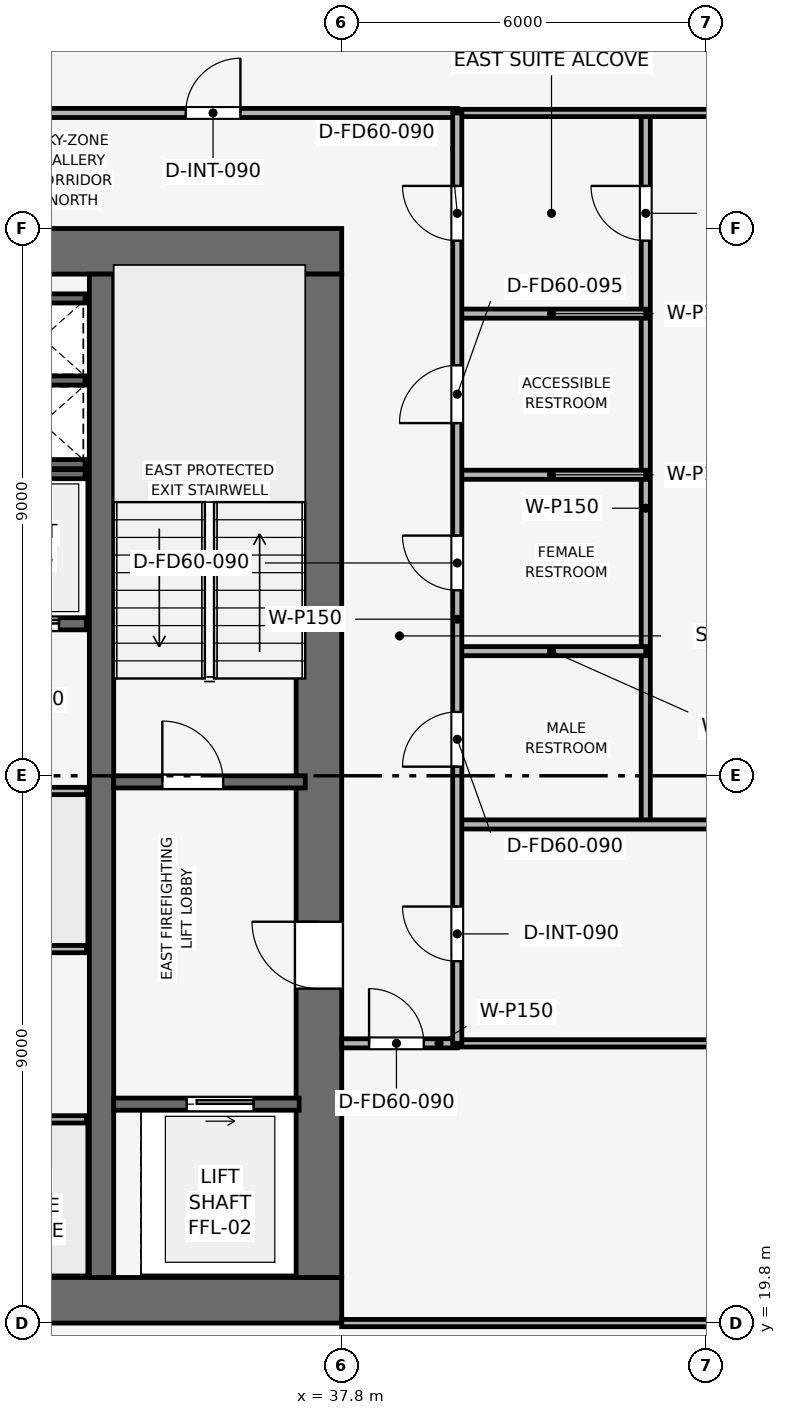
"""IFC4 building model, lengths in metres.
Left out: names, types, materials, properties, quantities, classifications, styles, units other than length and angle.
Written with IfcOpenShell. Run it as: python <this file> out.ifc"""

import sys

from ifc_helpers import new_model, si_unit, direction, frame, frame_2d, origin, place, context, subcontext, project, spatial, rectangle, extrude, element, fill, save


model = new_model("IFC4")
c1 = context("Model", 3, precision=1e-05, world=origin(), true_north=direction((0.0, 1.0)))
c2 = subcontext(c1, "Body", "Model", "MODEL_VIEW")
j1 = project(units=[si_unit("LENGTHUNIT", "METRE"), si_unit("PLANEANGLEUNIT", "RADIAN")], contexts=[c1])
p1 = place(None, origin())
s1 = spatial("IfcSite", under=j1, at=p1, CompositionType="ELEMENT")
p2 = place(p1, origin())
s2 = spatial("IfcBuilding", under=s1, at=p2, CompositionType="ELEMENT")
p3 = place(p2, frame((0.0, 0.0, 254.1)))
s3 = spatial("IfcBuildingStorey", under=s2, at=p3, CompositionType="ELEMENT", Elevation=254.1)
p4 = place(p3, frame((19.8, 20.175, 0.0), z_axis=(0.0, 0.0, 1.0), x_axis=(1.0, 0.0, 0.0)))
e1 = element("IfcWall", 1, at=p4, inside=s3, PredefinedType="SHEAR", context=c2, shape_type="SweptSolid", body=[
    extrude(rectangle(XDim=18.0, YDim=0.75, at=frame_2d((9.0, 0.0))), origin(), (0.0, 0.0, 1.0), 3.75),
])
p5 = place(p3, frame((19.8, 37.425, 0.0), z_axis=(0.0, 0.0, 1.0), x_axis=(1.0, 0.0, 0.0)))
e2 = element("IfcWall", 2, at=p5, inside=s3, PredefinedType="SHEAR", context=c2, shape_type="SweptSolid", body=[
    extrude(rectangle(XDim=18.0, YDim=0.75, at=frame_2d((9.0, 0.0))), origin(), (0.0, 0.0, 1.0), 3.75),
])
p6 = place(p5, frame((7.05, 0.0, 0.0)))
e3 = element("IfcOpeningElement", 3, at=p6, cuts=e2, PredefinedType="OPENING", context=c2, shape_type="SweptSolid", body=[
    extrude(rectangle(XDim=1.1, YDim=2.15, at=frame_2d((0.55, 1.075))), frame((0.0, 0.385, 0.0), z_axis=(0.0, -1.0, 0.0), x_axis=(1.0, 0.0, 0.0)), (0.0, 0.0, 1.0), 0.77),
])
p7 = place(p3, frame((37.425, 20.55, 0.0), z_axis=(0.0, 0.0, 1.0), x_axis=(0.0, 1.0, 0.0)))
e4 = element("IfcWall", 4, at=p7, inside=s3, PredefinedType="SHEAR", context=c2, shape_type="SweptSolid", body=[
    extrude(rectangle(XDim=16.5, YDim=0.75, at=frame_2d((8.25, 0.0))), origin(), (0.0, 0.0, 1.0), 3.75),
])
p8 = place(p7, frame((4.75, 0.0, 0.0)))
e5 = element("IfcOpeningElement", 5, at=p8, cuts=e4, PredefinedType="OPENING", context=c2, shape_type="SweptSolid", body=[
    extrude(rectangle(XDim=1.1, YDim=2.15, at=frame_2d((0.55, 1.075))), frame((0.0, 0.385, 0.0), z_axis=(0.0, -1.0, 0.0), x_axis=(1.0, 0.0, 0.0)), (0.0, 0.0, 1.0), 0.77),
])
p9 = place(p3, frame((33.85, 20.55, 0.0), z_axis=(0.0, 0.0, 1.0), x_axis=(0.0, 1.0, 0.0)))
e6 = element("IfcWall", 6, at=p9, inside=s3, PredefinedType="SHEAR", context=c2, shape_type="SweptSolid", body=[
    extrude(rectangle(XDim=16.5, YDim=0.4, at=frame_2d((8.25, 0.0))), origin(), (0.0, 0.0, 1.0), 3.75),
])
p10 = place(p3, frame((34.05, 28.7, 0.0), z_axis=(0.0, 0.0, 1.0), x_axis=(1.0, 0.0, 0.0)))
e7 = element("IfcWall", 7, at=p10, inside=s3, PredefinedType="SHEAR", context=c2, shape_type="SweptSolid", body=[
    extrude(rectangle(XDim=3.15, YDim=0.2, at=frame_2d((1.575, 0.0))), origin(), (0.0, 0.0, 1.0), 3.5),
])
p11 = place(p10, frame((0.8, 0.0, 0.0)))
e8 = element("IfcOpeningElement", 8, at=p11, cuts=e7, PredefinedType="OPENING", context=c2, shape_type="SweptSolid", body=[
    extrude(rectangle(XDim=1.0, YDim=2.1, at=frame_2d((0.5, 1.05))), frame((0.0, 0.11, 0.0), z_axis=(0.0, -1.0, 0.0), x_axis=(1.0, 0.0, 0.0)), (0.0, 0.0, 1.0), 0.22),
])
for number, where, z_axis, x_axis in (
    (9, (32.25, 33.925, 0.0), (0.0, 0.0, 1.0), (1.0, 0.0, 0.0)),
    (10, (32.25, 35.3, 0.0), (0.0, 0.0, 1.0), (1.0, 0.0, 0.0)),
):
    element("IfcWall", number, at=place(p3, frame(where, z_axis=z_axis, x_axis=x_axis)), inside=s3, PredefinedType="SHEAR", context=c2, shape_type="SweptSolid", body=[
        extrude(rectangle(XDim=1.33, YDim=0.15, at=frame_2d((0.665, 0.0))), origin(), (0.0, 0.0, 1.0), 3.5),
    ])
p12 = place(p3, frame((34.05, 23.4, 0.0), z_axis=(0.0, 0.0, 1.0), x_axis=(1.0, 0.0, 0.0)))
e11 = element("IfcWall", 11, at=p12, inside=s3, PredefinedType="SHEAR", context=c2, shape_type="SweptSolid", body=[
    extrude(rectangle(XDim=3.05, YDim=0.2, at=frame_2d((1.525, 0.0))), origin(), (0.0, 0.0, 1.0), 3.5),
])
p13 = place(p12, frame((1.2, 0.0, 0.0)))
e12 = element("IfcOpeningElement", 12, at=p13, cuts=e11, PredefinedType="OPENING", context=c2, shape_type="SweptSolid", body=[
    extrude(rectangle(XDim=1.1, YDim=2.15, at=frame_2d((0.55, 1.075))), frame((0.0, 0.11, 0.0), z_axis=(0.0, -1.0, 0.0), x_axis=(1.0, 0.0, 0.0)), (0.0, 0.0, 1.0), 0.22),
])
p14 = place(p3, frame((31.6, 31.3, 0.0), z_axis=(0.0, 0.0, 1.0), x_axis=(1.0, 0.0, 0.0)))
e13 = element("IfcWall", 13, at=p14, inside=s3, PredefinedType="SHEAR", context=c2, shape_type="SweptSolid", body=[
    extrude(rectangle(XDim=2.0, YDim=0.2, at=frame_2d((1.0, 0.0))), origin(), (0.0, 0.0, 1.0), 3.5),
])
p15 = place(p14, frame((0.45, 0.0, 0.0)))
e14 = element("IfcOpeningElement", 14, at=p15, cuts=e13, PredefinedType="OPENING", context=c2, shape_type="SweptSolid", body=[
    extrude(rectangle(XDim=1.1, YDim=2.15, at=frame_2d((0.55, 1.075))), frame((0.0, 0.11, 0.0), z_axis=(0.0, -1.0, 0.0), x_axis=(1.0, 0.0, 0.0)), (0.0, 0.0, 1.0), 0.22),
])
p16 = place(p3, frame((32.25, 36.65, 0.0), z_axis=(0.0, 0.0, 1.0), x_axis=(1.0, 0.0, 0.0)))
e15 = element("IfcWall", 15, at=p16, inside=s3, PredefinedType="SHEAR", context=c2, shape_type="SweptSolid", body=[
    extrude(rectangle(XDim=1.33, YDim=0.15, at=frame_2d((0.665, 0.0))), origin(), (0.0, 0.0, 1.0), 3.5),
])
p17 = place(p3, frame((29.5, 33.76, 0.0), z_axis=(0.0, 0.0, 1.0), x_axis=(1.0, 0.0, 0.0)))
e16 = element("IfcWall", 16, at=p17, inside=s3, PredefinedType="SHEAR", context=c2, shape_type="SweptSolid", body=[
    extrude(rectangle(XDim=4.08, YDim=0.15, at=frame_2d((2.04, 0.0))), origin(), (0.0, 0.0, 1.0), 3.5),
])
p18 = place(p3, frame((29.55, 23.15, 0.0), z_axis=(0.0, 0.0, 1.0), x_axis=(1.0, 0.0, 0.0)))
e17 = element("IfcWall", 17, at=p18, inside=s3, PredefinedType="PARTITIONING", context=c2, shape_type="SweptSolid", body=[
    extrude(rectangle(XDim=4.05, YDim=0.12, at=frame_2d((2.025, 0.0))), origin(), (0.0, 0.0, 1.0), 3.5),
])
p19 = place(p18, frame((1.575, 0.0, 0.0)))
e18 = element("IfcOpeningElement", 18, at=p19, cuts=e17, PredefinedType="OPENING", context=c2, shape_type="SweptSolid", body=[
    extrude(rectangle(XDim=0.9, YDim=2.1, at=frame_2d((0.45, 1.05))), frame((0.0, 0.07, 0.0), z_axis=(0.0, -1.0, 0.0), x_axis=(1.0, 0.0, 0.0)), (0.0, 0.0, 1.0), 0.14),
])
p20 = place(p3, frame((29.55, 25.95, 0.0), z_axis=(0.0, 0.0, 1.0), x_axis=(1.0, 0.0, 0.0)))
e19 = element("IfcWall", 19, at=p20, inside=s3, PredefinedType="PARTITIONING", context=c2, shape_type="SweptSolid", body=[
    extrude(rectangle(XDim=4.05, YDim=0.12, at=frame_2d((2.025, 0.0))), origin(), (0.0, 0.0, 1.0), 3.5),
])
p21 = place(p20, frame((1.575, 0.0, 0.0)))
e20 = element("IfcOpeningElement", 20, at=p21, cuts=e19, PredefinedType="OPENING", context=c2, shape_type="SweptSolid", body=[
    extrude(rectangle(XDim=0.9, YDim=2.1, at=frame_2d((0.45, 1.05))), frame((0.0, 0.07, 0.0), z_axis=(0.0, -1.0, 0.0), x_axis=(1.0, 0.0, 0.0)), (0.0, 0.0, 1.0), 0.14),
])
p22 = place(p3, frame((29.55, 28.55, 0.0), z_axis=(0.0, 0.0, 1.0), x_axis=(1.0, 0.0, 0.0)))
e21 = element("IfcWall", 21, at=p22, inside=s3, PredefinedType="PARTITIONING", context=c2, shape_type="SweptSolid", body=[
    extrude(rectangle(XDim=4.05, YDim=0.12, at=frame_2d((2.025, 0.0))), origin(), (0.0, 0.0, 1.0), 3.5),
])
p23 = place(p3, frame((37.8, 19.8, 0.0), z_axis=(0.0, 0.0, 1.0), x_axis=(1.0, 0.0, 0.0)))
e22 = element("IfcWall", 22, at=p23, inside=s3, PredefinedType="PARTITIONING", context=c2, shape_type="SweptSolid", body=[
    extrude(rectangle(XDim=15.77, YDim=0.12, at=frame_2d((7.885, 0.0))), origin(), (0.0, 0.0, 1.0), 3.085),
])
p24 = place(p3, frame((37.8, 24.4, 0.0), z_axis=(0.0, 0.0, 1.0), x_axis=(1.0, 0.0, 0.0)))
e23 = element("IfcWall", 23, at=p24, inside=s3, PredefinedType="PARTITIONING", context=c2, shape_type="SweptSolid", body=[
    extrude(rectangle(XDim=1.9, YDim=0.15, at=frame_2d((0.95, 0.0))), origin(), (0.0, 0.0, 1.0), 3.5),
])
p25 = place(p24, frame((0.45, 0.0, 0.0)))
e24 = element("IfcOpeningElement", 24, at=p25, cuts=e23, PredefinedType="OPENING", context=c2, shape_type="SweptSolid", body=[
    extrude(rectangle(XDim=0.9, YDim=2.1, at=frame_2d((0.45, 1.05))), frame((0.0, 0.085, 0.0), z_axis=(0.0, -1.0, 0.0), x_axis=(1.0, 0.0, 0.0)), (0.0, 0.0, 1.0), 0.17),
])
p26 = place(p3, frame((39.7, 24.4, 0.0), z_axis=(0.0, 0.0, 1.0), x_axis=(1.0, 0.0, 0.0)))
e25 = element("IfcWall", 25, at=p26, inside=s3, PredefinedType="PARTITIONING", context=c2, shape_type="SweptSolid", body=[
    extrude(rectangle(XDim=13.87, YDim=0.12, at=frame_2d((6.935, 0.0))), origin(), (0.0, 0.0, 1.0), 3.085),
])
p27 = place(p3, frame((42.8, 28.0, 0.0), z_axis=(0.0, 0.0, 1.0), x_axis=(0.0, 1.0, 0.0)))
e26 = element("IfcWall", 26, at=p27, inside=s3, PredefinedType="PARTITIONING", context=c2, shape_type="SweptSolid", body=[
    extrude(rectangle(XDim=11.7, YDim=0.15, at=frame_2d((5.85, 0.0))), origin(), (0.0, 0.0, 1.0), 3.085),
])
p28 = place(p27, frame((9.6, 0.0, 0.0)))
e27 = element("IfcOpeningElement", 27, at=p28, cuts=e26, PredefinedType="OPENING", context=c2, shape_type="SweptSolid", body=[
    extrude(rectangle(XDim=0.9, YDim=2.1, at=frame_2d((0.45, 1.05))), frame((0.0, 0.085, 0.0), z_axis=(0.0, -1.0, 0.0), x_axis=(1.0, 0.0, 0.0)), (0.0, 0.0, 1.0), 0.17),
])
p29 = place(p3, frame((39.7, 28.0, 0.0), z_axis=(0.0, 0.0, 1.0), x_axis=(1.0, 0.0, 0.0)))
e28 = element("IfcWall", 28, at=p29, inside=s3, PredefinedType="PARTITIONING", context=c2, shape_type="SweptSolid", body=[
    extrude(rectangle(XDim=13.87, YDim=0.15, at=frame_2d((6.935, 0.0))), origin(), (0.0, 0.0, 1.0), 3.085),
])
for number, where, z_axis, x_axis in (
    (29, (39.7, 36.4, 0.0), (0.0, 0.0, 1.0), (1.0, 0.0, 0.0)),
    (30, (39.7, 30.85, 0.0), (0.0, 0.0, 1.0), (1.0, 0.0, 0.0)),
    (31, (39.7, 33.75, 0.0), (0.0, 0.0, 1.0), (1.0, 0.0, 0.0)),
):
    element("IfcWall", number, at=place(p3, frame(where, z_axis=z_axis, x_axis=x_axis)), inside=s3, PredefinedType="PARTITIONING", context=c2, shape_type="SweptSolid", body=[
        extrude(rectangle(XDim=3.1, YDim=0.15, at=frame_2d((1.55, 0.0))), origin(), (0.0, 0.0, 1.0), 3.5),
    ])
p30 = place(p3, frame((39.7, 39.7, 0.0), z_axis=(0.0, 0.0, 1.0), x_axis=(1.0, 0.0, 0.0)))
e32 = element("IfcWall", 32, at=p30, inside=s3, PredefinedType="PARTITIONING", context=c2, shape_type="SweptSolid", body=[
    extrude(rectangle(XDim=13.87, YDim=0.12, at=frame_2d((6.935, 0.0))), origin(), (0.0, 0.0, 1.0), 3.085),
])
p31 = place(p3, frame((17.9, 39.7, 0.0), z_axis=(0.0, 0.0, 1.0), x_axis=(1.0, 0.0, 0.0)))
e33 = element("IfcWall", 33, at=p31, inside=s3, PredefinedType="PARTITIONING", context=c2, shape_type="SweptSolid", body=[
    extrude(rectangle(XDim=21.8, YDim=0.15, at=frame_2d((10.9, 0.0))), origin(), (0.0, 0.0, 1.0), 3.085),
])
p32 = place(p31, frame((0.7, 0.0, 0.0)))
e34 = element("IfcOpeningElement", 34, at=p32, cuts=e33, PredefinedType="OPENING", context=c2, shape_type="SweptSolid", body=[
    extrude(rectangle(XDim=0.9, YDim=2.1, at=frame_2d((0.45, 1.05))), frame((0.0, 0.085, 0.0), z_axis=(0.0, -1.0, 0.0), x_axis=(1.0, 0.0, 0.0)), (0.0, 0.0, 1.0), 0.17),
])
p33 = place(p31, frame((4.801, 0.0, 0.0)))
e35 = element("IfcOpeningElement", 35, at=p33, cuts=e33, PredefinedType="OPENING", context=c2, shape_type="SweptSolid", body=[
    extrude(rectangle(XDim=0.9, YDim=2.1, at=frame_2d((0.45, 1.05))), frame((0.0, 0.085, 0.0), z_axis=(0.0, -1.0, 0.0), x_axis=(1.0, 0.0, 0.0)), (0.0, 0.0, 1.0), 0.17),
])
p34 = place(p31, frame((10.535, 0.0, 0.0)))
e36 = element("IfcOpeningElement", 36, at=p34, cuts=e33, PredefinedType="OPENING", context=c2, shape_type="SweptSolid", body=[
    extrude(rectangle(XDim=0.9, YDim=2.1, at=frame_2d((0.45, 1.05))), frame((0.0, 0.085, 0.0), z_axis=(0.0, -1.0, 0.0), x_axis=(1.0, 0.0, 0.0)), (0.0, 0.0, 1.0), 0.17),
])
p35 = place(p31, frame((17.334, 0.0, 0.0)))
e37 = element("IfcOpeningElement", 37, at=p35, cuts=e33, PredefinedType="OPENING", context=c2, shape_type="SweptSolid", body=[
    extrude(rectangle(XDim=0.9, YDim=2.1, at=frame_2d((0.45, 1.05))), frame((0.0, 0.085, 0.0), z_axis=(0.0, -1.0, 0.0), x_axis=(1.0, 0.0, 0.0)), (0.0, 0.0, 1.0), 0.17),
])
p36 = place(p3, frame((39.7, 24.4, 0.0), z_axis=(0.0, 0.0, 1.0), x_axis=(0.0, 1.0, 0.0)))
e38 = element("IfcWall", 38, at=p36, inside=s3, PredefinedType="PARTITIONING", context=c2, shape_type="SweptSolid", body=[
    extrude(rectangle(XDim=15.3, YDim=0.15, at=frame_2d((7.65, 0.0))), origin(), (0.0, 0.0, 1.0), 3.085),
])
p37 = place(p36, frame((1.35, 0.0, 0.0)))
e39 = element("IfcOpeningElement", 39, at=p37, cuts=e38, PredefinedType="OPENING", context=c2, shape_type="SweptSolid", body=[
    extrude(rectangle(XDim=0.9, YDim=2.1, at=frame_2d((0.45, 1.05))), frame((0.0, 0.085, 0.0), z_axis=(0.0, -1.0, 0.0), x_axis=(1.0, 0.0, 0.0)), (0.0, 0.0, 1.0), 0.17),
])
p38 = place(p36, frame((4.55, 0.0, 0.0)))
e40 = element("IfcOpeningElement", 40, at=p38, cuts=e38, PredefinedType="OPENING", context=c2, shape_type="SweptSolid", body=[
    extrude(rectangle(XDim=0.9, YDim=2.1, at=frame_2d((0.45, 1.05))), frame((0.0, 0.085, 0.0), z_axis=(0.0, -1.0, 0.0), x_axis=(1.0, 0.0, 0.0)), (0.0, 0.0, 1.0), 0.17),
])
p39 = place(p36, frame((7.45, 0.0, 0.0)))
e41 = element("IfcOpeningElement", 41, at=p39, cuts=e38, PredefinedType="OPENING", context=c2, shape_type="SweptSolid", body=[
    extrude(rectangle(XDim=0.9, YDim=2.1, at=frame_2d((0.45, 1.05))), frame((0.0, 0.085, 0.0), z_axis=(0.0, -1.0, 0.0), x_axis=(1.0, 0.0, 0.0)), (0.0, 0.0, 1.0), 0.17),
])
p40 = place(p36, frame((10.2, 0.0, 0.0)))
e42 = element("IfcOpeningElement", 42, at=p40, cuts=e38, PredefinedType="OPENING", context=c2, shape_type="SweptSolid", body=[
    extrude(rectangle(XDim=0.95, YDim=2.1, at=frame_2d((0.475, 1.05))), frame((0.0, 0.085, 0.0), z_axis=(0.0, -1.0, 0.0), x_axis=(1.0, 0.0, 0.0)), (0.0, 0.0, 1.0), 0.17),
])
p41 = place(p36, frame((13.2, 0.0, 0.0)))
e43 = element("IfcOpeningElement", 43, at=p41, cuts=e38, PredefinedType="OPENING", context=c2, shape_type="SweptSolid", body=[
    extrude(rectangle(XDim=0.9, YDim=2.1, at=frame_2d((0.45, 1.05))), frame((0.0, 0.085, 0.0), z_axis=(0.0, -1.0, 0.0), x_axis=(1.0, 0.0, 0.0)), (0.0, 0.0, 1.0), 0.17),
])
p42 = place(p11, origin())
e44 = element("IfcDoor", 44, at=p42, inside=s3, OperationType="SINGLE_SWING_LEFT", PredefinedType="DOOR", context=c2, shape_type="SweptSolid", body=[
    extrude(rectangle(XDim=1.0, YDim=2.1, at=frame_2d((0.5, 1.05))), frame((0.0, 0.025, 0.0), z_axis=(0.0, -1.0, 0.0), x_axis=(1.0, 0.0, 0.0)), (0.0, 0.0, 1.0), 0.05),
])
fill(e8, e44)
p43 = place(p13, origin())
e45 = element("IfcDoor", 45, at=p43, inside=s3, OperationType="SLIDING_TO_RIGHT", PredefinedType="DOOR", context=c2, shape_type="SweptSolid", body=[
    extrude(rectangle(XDim=1.1, YDim=2.15, at=frame_2d((0.55, 1.075))), frame((0.0, 0.025, 0.0), z_axis=(0.0, -1.0, 0.0), x_axis=(1.0, 0.0, 0.0)), (0.0, 0.0, 1.0), 0.05),
])
fill(e12, e45)
p44 = place(p15, origin())
e46 = element("IfcDoor", 46, at=p44, inside=s3, OperationType="SLIDING_TO_RIGHT", PredefinedType="DOOR", context=c2, shape_type="SweptSolid", body=[
    extrude(rectangle(XDim=1.1, YDim=2.15, at=frame_2d((0.55, 1.075))), frame((0.0, 0.025, 0.0), z_axis=(0.0, -1.0, 0.0), x_axis=(1.0, 0.0, 0.0)), (0.0, 0.0, 1.0), 0.05),
])
fill(e14, e46)
p45 = place(p25, origin())
e47 = element("IfcDoor", 47, at=p45, inside=s3, OperationType="SINGLE_SWING_LEFT", PredefinedType="DOOR", context=c2, shape_type="SweptSolid", body=[
    extrude(rectangle(XDim=0.9, YDim=2.1, at=frame_2d((0.45, 1.05))), frame((0.0, 0.025, 0.0), z_axis=(0.0, -1.0, 0.0), x_axis=(1.0, 0.0, 0.0)), (0.0, 0.0, 1.0), 0.05),
])
fill(e24, e47)
p46 = place(p28, origin())
e48 = element("IfcDoor", 48, at=p46, inside=s3, OperationType="SINGLE_SWING_RIGHT", PredefinedType="DOOR", context=c2, shape_type="SweptSolid", body=[
    extrude(rectangle(XDim=0.9, YDim=2.1, at=frame_2d((0.45, 1.05))), frame((0.0, 0.025, 0.0), z_axis=(0.0, -1.0, 0.0), x_axis=(1.0, 0.0, 0.0)), (0.0, 0.0, 1.0), 0.05),
])
fill(e27, e48)
p47 = place(p35, origin())
e49 = element("IfcDoor", 49, at=p47, inside=s3, OperationType="SINGLE_SWING_RIGHT", PredefinedType="DOOR", context=c2, shape_type="SweptSolid", body=[
    extrude(rectangle(XDim=0.9, YDim=2.1, at=frame_2d((0.45, 1.05))), frame((0.0, 0.025, 0.0), z_axis=(0.0, -1.0, 0.0), x_axis=(1.0, 0.0, 0.0)), (0.0, 0.0, 1.0), 0.05),
])
fill(e37, e49)
p48 = place(p37, origin())
e50 = element("IfcDoor", 50, at=p48, inside=s3, OperationType="SINGLE_SWING_RIGHT", PredefinedType="DOOR", context=c2, shape_type="SweptSolid", body=[
    extrude(rectangle(XDim=0.9, YDim=2.1, at=frame_2d((0.45, 1.05))), frame((0.0, 0.025, 0.0), z_axis=(0.0, -1.0, 0.0), x_axis=(1.0, 0.0, 0.0)), (0.0, 0.0, 1.0), 0.05),
])
fill(e39, e50)
p49 = place(p38, origin())
e51 = element("IfcDoor", 51, at=p49, inside=s3, OperationType="SINGLE_SWING_LEFT", PredefinedType="DOOR", context=c2, shape_type="SweptSolid", body=[
    extrude(rectangle(XDim=0.9, YDim=2.1, at=frame_2d((0.45, 1.05))), frame((0.0, 0.025, 0.0), z_axis=(0.0, -1.0, 0.0), x_axis=(1.0, 0.0, 0.0)), (0.0, 0.0, 1.0), 0.05),
])
fill(e40, e51)
p50 = place(p39, origin())
e52 = element("IfcDoor", 52, at=p50, inside=s3, OperationType="SINGLE_SWING_RIGHT", PredefinedType="DOOR", context=c2, shape_type="SweptSolid", body=[
    extrude(rectangle(XDim=0.9, YDim=2.1, at=frame_2d((0.45, 1.05))), frame((0.0, 0.025, 0.0), z_axis=(0.0, -1.0, 0.0), x_axis=(1.0, 0.0, 0.0)), (0.0, 0.0, 1.0), 0.05),
])
fill(e41, e52)
p51 = place(p40, origin())
e53 = element("IfcDoor", 53, at=p51, inside=s3, OperationType="SINGLE_SWING_LEFT", PredefinedType="DOOR", context=c2, shape_type="SweptSolid", body=[
    extrude(rectangle(XDim=0.95, YDim=2.1, at=frame_2d((0.475, 1.05))), frame((0.0, 0.025, 0.0), z_axis=(0.0, -1.0, 0.0), x_axis=(1.0, 0.0, 0.0)), (0.0, 0.0, 1.0), 0.05),
])
fill(e42, e53)
p52 = place(p41, origin())
e54 = element("IfcDoor", 54, at=p52, inside=s3, OperationType="SINGLE_SWING_RIGHT", PredefinedType="DOOR", context=c2, shape_type="SweptSolid", body=[
    extrude(rectangle(XDim=0.9, YDim=2.1, at=frame_2d((0.45, 1.05))), frame((0.0, 0.025, 0.0), z_axis=(0.0, -1.0, 0.0), x_axis=(1.0, 0.0, 0.0)), (0.0, 0.0, 1.0), 0.05),
])
fill(e43, e54)
p53 = place(p8, origin())
e55 = element("IfcDoor", 55, at=p53, inside=s3, OperationType="SINGLE_SWING_RIGHT", PredefinedType="DOOR", context=c2, shape_type="SweptSolid", body=[
    extrude(rectangle(XDim=1.1, YDim=2.15, at=frame_2d((0.55, 1.075))), frame((0.0, 0.025, 0.0), z_axis=(0.0, -1.0, 0.0), x_axis=(1.0, 0.0, 0.0)), (0.0, 0.0, 1.0), 0.05),
])
fill(e5, e55)
save(model, sys.argv[1])
